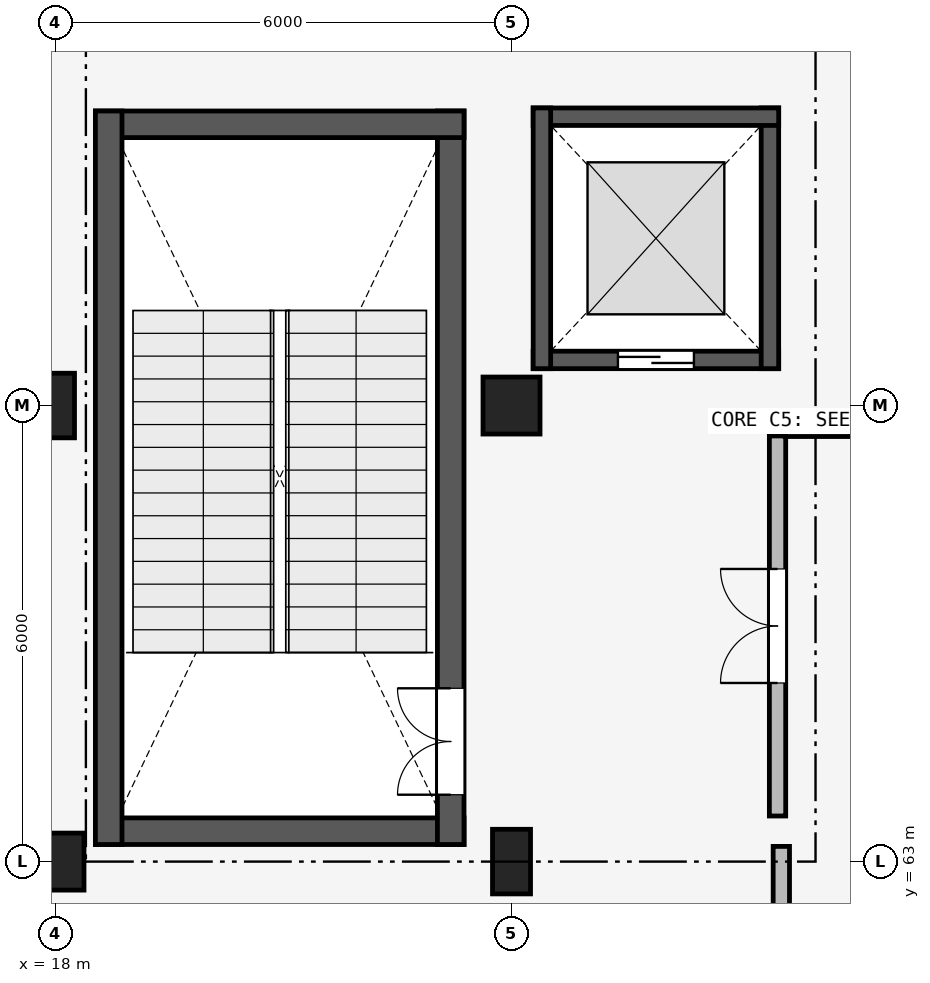
"""IFC4 building model, lengths in metres.
Left out: names, types, materials, properties, quantities, classifications, styles, units other than length and angle.
Written with IfcOpenShell. Run it as: python <this file> out.ifc"""

import sys

from ifc_helpers import new_model, si_unit, direction, frame, frame_2d, origin, origin_2d, place, context, subcontext, project, spatial, rectangle, extrude, element, fill, save


model = new_model("IFC4")
c1 = context("Model", 3, precision=1e-05, world=origin(), true_north=direction((0.0, 1.0)))
c2 = subcontext(c1, "Body", "Model", "MODEL_VIEW")
j1 = project(units=[si_unit("LENGTHUNIT", "METRE"), si_unit("PLANEANGLEUNIT", "RADIAN")], contexts=[c1])
p1 = place(None, origin())
s1 = spatial("IfcSite", under=j1, at=p1, CompositionType="ELEMENT")
p2 = place(p1, origin())
s2 = spatial("IfcBuilding", under=s1, at=p2, CompositionType="ELEMENT")
p3 = place(p2, origin())
s3 = spatial("IfcBuildingStorey", under=s2, at=p3, CompositionType="ELEMENT", Elevation=0.0)
p4 = place(p3, frame((18.0, 63.0, 0.0), z_axis=(0.0, 0.0, 1.0), x_axis=(1.0, 0.0, 0.0)))
e1 = element("IfcColumn", 1, at=p4, inside=s3, PredefinedType="COLUMN", context=c2, shape_type="SweptSolid", body=[
    extrude(rectangle(XDim=0.75, YDim=0.75, at=origin_2d()), origin(), (0.0, 0.0, 1.0), 4.8),
])
for number, where, z_axis, x_axis in (
    (2, (18.0, 69.0, 0.0), (0.0, 0.0, 1.0), (1.0, 0.0, 0.0)),
    (3, (24.0, 63.0, 0.0), (0.0, 0.0, 1.0), (1.0, 0.0, 0.0)),
):
    element("IfcColumn", number, at=place(p3, frame(where, z_axis=z_axis, x_axis=x_axis)), inside=s3, PredefinedType="COLUMN", context=c2, shape_type="SweptSolid", body=[
        extrude(rectangle(XDim=0.5, YDim=0.85, at=origin_2d()), origin(), (0.0, 0.0, 1.0), 4.8),
    ])
p5 = place(p3, frame((24.0, 69.0, 0.0), z_axis=(0.0, 0.0, 1.0), x_axis=(1.0, 0.0, 0.0)))
e4 = element("IfcColumn", 4, at=p5, inside=s3, PredefinedType="COLUMN", context=c2, shape_type="SweptSolid", body=[
    extrude(rectangle(XDim=0.75, YDim=0.75, at=origin_2d()), origin(), (0.0, 0.0, 1.0), 4.8),
])
p6 = place(p3, frame((18.525, 63.4, 0.0), z_axis=(0.0, 0.0, 1.0), x_axis=(1.0, 0.0, 0.0)))
e5 = element("IfcWall", 5, at=p6, inside=s3, PredefinedType="SHEAR", context=c2, shape_type="SweptSolid", body=[
    extrude(rectangle(XDim=4.85, YDim=0.35, at=frame_2d((2.425, 0.0))), origin(), (0.0, 0.0, 1.0), 4.66),
])
p7 = place(p3, frame((23.2, 63.225, 0.0), z_axis=(0.0, 0.0, 1.0), x_axis=(0.0, 1.0, 0.0)))
e6 = element("IfcWall", 6, at=p7, inside=s3, PredefinedType="SHEAR", context=c2, shape_type="SweptSolid", body=[
    extrude(rectangle(XDim=9.65, YDim=0.35, at=frame_2d((4.825, 0.0))), origin(), (0.0, 0.0, 1.0), 4.66),
])
p8 = place(p7, frame((0.655, 0.0, 0.0)))
e7 = element("IfcOpeningElement", 7, at=p8, cuts=e6, PredefinedType="OPENING", context=c2, shape_type="SweptSolid", body=[
    extrude(rectangle(XDim=1.4, YDim=2.2, at=frame_2d((0.7, 1.1))), frame((0.0, 0.185, 0.0), z_axis=(0.0, -1.0, 0.0), x_axis=(1.0, 0.0, 0.0)), (0.0, 0.0, 1.0), 0.37),
])
p9 = place(p3, frame((23.375, 72.7, 0.0), z_axis=(0.0, 0.0, 1.0), x_axis=(-1.0, 0.0, 0.0)))
e8 = element("IfcWall", 8, at=p9, inside=s3, PredefinedType="SHEAR", context=c2, shape_type="SweptSolid", body=[
    extrude(rectangle(XDim=4.85, YDim=0.35, at=frame_2d((2.425, 0.0))), origin(), (0.0, 0.0, 1.0), 4.66),
])
p10 = place(p3, frame((18.7, 72.875, 0.0), z_axis=(0.0, 0.0, 1.0), x_axis=(0.0, -1.0, 0.0)))
e9 = element("IfcWall", 9, at=p10, inside=s3, PredefinedType="SHEAR", context=c2, shape_type="SweptSolid", body=[
    extrude(rectangle(XDim=9.65, YDim=0.35, at=frame_2d((4.825, 0.0))), origin(), (0.0, 0.0, 1.0), 4.66),
])
p11 = place(p3, frame((27.5, 63.6, 0.0), z_axis=(0.0, 0.0, 1.0), x_axis=(0.0, 1.0, 0.0)))
e10 = element("IfcWall", 10, at=p11, inside=s3, PredefinedType="PARTITIONING", context=c2, shape_type="SweptSolid", body=[
    extrude(rectangle(XDim=5.0, YDim=0.215, at=frame_2d((2.5, 0.0))), origin(), (0.0, 0.0, 1.0), 4.49),
])
p12 = place(p11, frame((1.75, 0.0, 0.0)))
e11 = element("IfcOpeningElement", 11, at=p12, cuts=e10, PredefinedType="OPENING", context=c2, shape_type="SweptSolid", body=[
    extrude(rectangle(XDim=1.5, YDim=2.15, at=frame_2d((0.75, 1.075))), frame((0.0, 0.117, 0.0), z_axis=(0.0, -1.0, 0.0), x_axis=(1.0, 0.0, 0.0)), (0.0, 0.0, 1.0), 0.235),
])
p13 = place(p3, frame((24.285, 69.6, 0.0), z_axis=(0.0, 0.0, 1.0), x_axis=(1.0, 0.0, 0.0)))
e12 = element("IfcWall", 12, at=p13, inside=s3, PredefinedType="SHEAR", context=c2, shape_type="SweptSolid", body=[
    extrude(rectangle(XDim=3.23, YDim=0.23, at=frame_2d((1.615, 0.0))), origin(), (0.0, 0.0, 1.0), 4.8),
])
p14 = place(p13, frame((1.115, 0.0, 0.0)))
e13 = element("IfcOpeningElement", 13, at=p14, cuts=e12, PredefinedType="OPENING", context=c2, shape_type="SweptSolid", body=[
    extrude(rectangle(XDim=1.0, YDim=2.15, at=frame_2d((0.5, 1.075))), frame((0.0, 0.125, 0.0), z_axis=(0.0, -1.0, 0.0), x_axis=(1.0, 0.0, 0.0)), (0.0, 0.0, 1.0), 0.25),
])
p15 = place(p3, frame((27.4, 69.485, 0.0), z_axis=(0.0, 0.0, 1.0), x_axis=(0.0, 1.0, 0.0)))
e14 = element("IfcWall", 14, at=p15, inside=s3, PredefinedType="SHEAR", context=c2, shape_type="SweptSolid", body=[
    extrude(rectangle(XDim=3.43, YDim=0.23, at=frame_2d((1.715, 0.0))), origin(), (0.0, 0.0, 1.0), 4.8),
])
p16 = place(p3, frame((27.515, 72.8, 0.0), z_axis=(0.0, 0.0, 1.0), x_axis=(-1.0, 0.0, 0.0)))
e15 = element("IfcWall", 15, at=p16, inside=s3, PredefinedType="SHEAR", context=c2, shape_type="SweptSolid", body=[
    extrude(rectangle(XDim=3.23, YDim=0.23, at=frame_2d((1.615, 0.0))), origin(), (0.0, 0.0, 1.0), 4.8),
])
p17 = place(p3, frame((24.4, 72.915, 0.0), z_axis=(0.0, 0.0, 1.0), x_axis=(0.0, -1.0, 0.0)))
e16 = element("IfcWall", 16, at=p17, inside=s3, PredefinedType="SHEAR", context=c2, shape_type="SweptSolid", body=[
    extrude(rectangle(XDim=3.43, YDim=0.23, at=frame_2d((1.715, 0.0))), origin(), (0.0, 0.0, 1.0), 4.8),
])
p18 = place(p3, frame((27.55, 57.55, 0.0), z_axis=(0.0, 0.0, 1.0), x_axis=(0.0, 1.0, 0.0)))
e17 = element("IfcWall", 17, at=p18, inside=s3, PredefinedType="PARTITIONING", context=c2, shape_type="SweptSolid", body=[
    extrude(rectangle(XDim=5.65, YDim=0.215, at=frame_2d((2.825, 0.0))), origin(), (0.0, 0.0, 1.0), 4.09),
])
p19 = place(p18, frame((2.075, 0.0, 0.0)))
e18 = element("IfcOpeningElement", 18, at=p19, cuts=e17, PredefinedType="OPENING", context=c2, shape_type="SweptSolid", body=[
    extrude(rectangle(XDim=1.5, YDim=2.15, at=frame_2d((0.75, 1.075))), frame((0.0, 0.117, 0.0), z_axis=(0.0, -1.0, 0.0), x_axis=(1.0, 0.0, 0.0)), (0.0, 0.0, 1.0), 0.235),
])
p20 = place(p3, frame((27.6, 68.7, 0.0), z_axis=(0.0, 0.0, 1.0), x_axis=(1.0, 0.0, 0.0)))
e19 = element("IfcWall", 19, at=p20, inside=s3, PredefinedType="PARTITIONING", context=c2, shape_type="SweptSolid", body=[
    extrude(rectangle(XDim=3.1, YDim=0.215, at=frame_2d((1.55, 0.0))), origin(), (0.0, 0.0, 1.0), 4.04),
])
p21 = place(p8, origin())
e20 = element("IfcDoor", 20, at=p21, inside=s3, OperationType="DOUBLE_DOOR_SINGLE_SWING", PredefinedType="DOOR", context=c2, shape_type="SweptSolid", body=[
    extrude(rectangle(XDim=1.4, YDim=2.2, at=frame_2d((0.7, 1.1))), frame((0.0, 0.025, 0.0), z_axis=(0.0, -1.0, 0.0), x_axis=(1.0, 0.0, 0.0)), (0.0, 0.0, 1.0), 0.05),
])
fill(e7, e20)
p22 = place(p12, origin())
e21 = element("IfcDoor", 21, at=p22, inside=s3, OperationType="DOUBLE_DOOR_SINGLE_SWING", PredefinedType="DOOR", context=c2, shape_type="SweptSolid", body=[
    extrude(rectangle(XDim=1.5, YDim=2.15, at=frame_2d((0.75, 1.075))), frame((0.0, 0.025, 0.0), z_axis=(0.0, -1.0, 0.0), x_axis=(1.0, 0.0, 0.0)), (0.0, 0.0, 1.0), 0.05),
])
fill(e11, e21)
p23 = place(p14, origin())
e22 = element("IfcDoor", 22, at=p23, inside=s3, OperationType="SLIDING_TO_LEFT", PredefinedType="DOOR", context=c2, shape_type="SweptSolid", body=[
    extrude(rectangle(XDim=1.0, YDim=2.15, at=frame_2d((0.5, 1.075))), frame((0.0, 0.025, 0.0), z_axis=(0.0, -1.0, 0.0), x_axis=(1.0, 0.0, 0.0)), (0.0, 0.0, 1.0), 0.05),
])
fill(e13, e22)
save(model, sys.argv[1])
